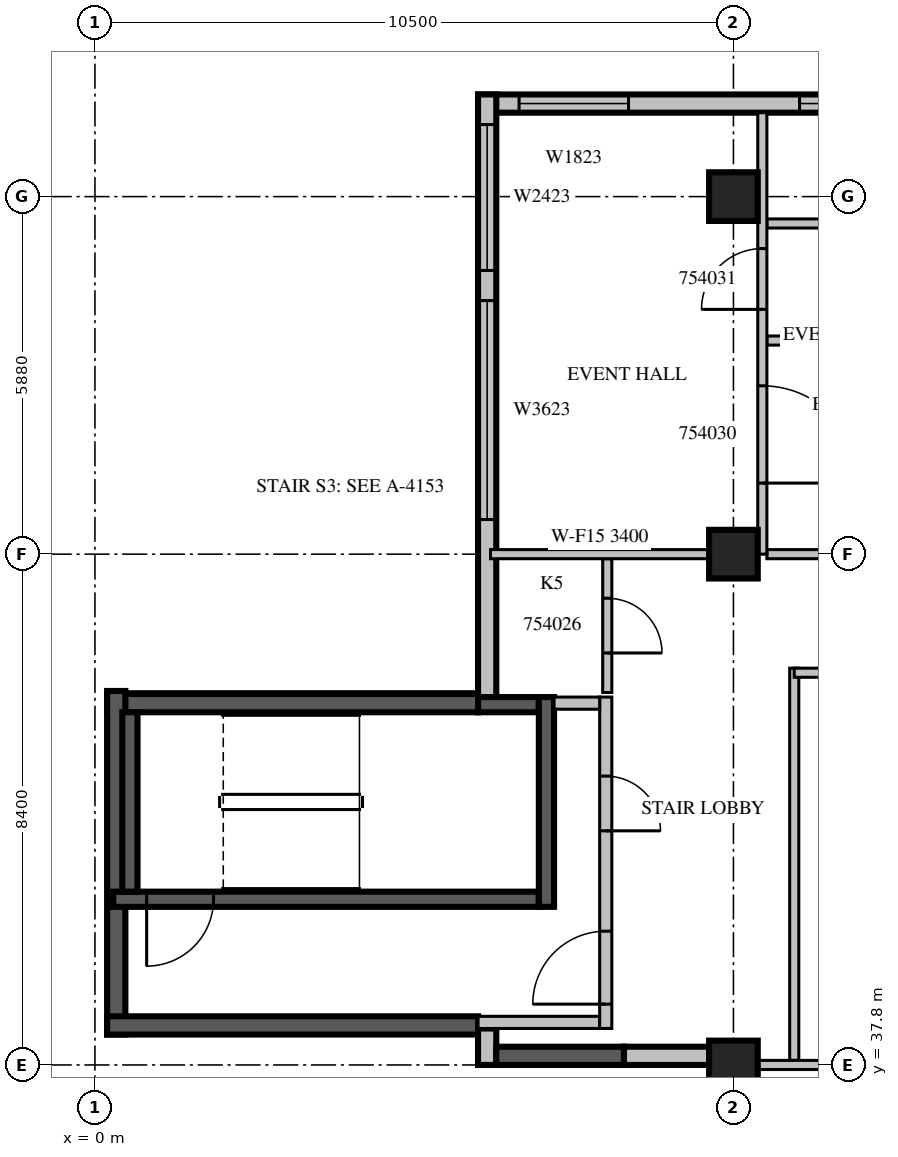
"""IFC4 building model, lengths in metres.
Left out: names, types, materials, properties, quantities, classifications, styles, units other than length and angle.
Written with IfcOpenShell. Run it as: python <this file> out.ifc"""

import sys

from ifc_helpers import new_model, si_unit, direction, frame, frame_2d, origin, origin_2d, place, context, subcontext, project, spatial, rectangle, extrude, source, transform, mapped, element, fill, save


model = new_model("IFC4")
c1 = context("Model", 3, precision=1e-05, world=origin(), true_north=direction((0.0, 1.0)))
c2 = subcontext(c1, "Body", "Model", "MODEL_VIEW")
j1 = project(units=[si_unit("LENGTHUNIT", "METRE"), si_unit("PLANEANGLEUNIT", "RADIAN")], contexts=[c1])
p1 = place(None, origin())
s1 = spatial("IfcSite", under=j1, at=p1, CompositionType="ELEMENT")
p2 = place(p1, origin())
s2 = spatial("IfcBuilding", under=s1, at=p2, CompositionType="ELEMENT")
p3 = place(p2, frame((0.0, 0.0, 238.6)))
s3 = spatial("IfcBuildingStorey", under=s2, at=p3, CompositionType="ELEMENT", Elevation=238.6)
m1 = source(origin(), c2, "Body", "SweptSolid", [
    extrude(rectangle(XDim=0.8, YDim=0.8, at=origin_2d()), origin(), (0.0, 0.0, 1.0), 3.8),
])
for number, where, z_axis, x_axis in (
    (1, (10.5, 37.8, 0.0), (0.0, 0.0, 1.0), (1.0, 0.0, 0.0)),
    (2, (10.5, 46.2, 0.0), (0.0, 0.0, 1.0), (1.0, 0.0, 0.0)),
    (3, (10.5, 52.08, 0.0), (0.0, 0.0, 1.0), (1.0, 0.0, 0.0)),
):
    element("IfcColumn", number, at=place(p3, frame(where, z_axis=z_axis, x_axis=x_axis)), inside=s3, PredefinedType="COLUMN", context=c2, shape_type="MappedRepresentation", body=[
        mapped(m1, transform((0.0, 0.0, 0.0), scale=1.0)),
    ])
m2 = source(origin(), c2, "Body", "SweptSolid", [
    extrude(rectangle(XDim=10.5, YDim=0.3, at=frame_2d((5.25, 0.0))), origin(), (0.0, 0.0, 1.0), 3.4),
])
p4 = place(p3, frame((16.8, 53.61, 0.0), z_axis=(0.0, 0.0, 1.0), x_axis=(-1.0, 0.0, 0.0)))
e4 = element("IfcWall", 4, at=p4, inside=s3, PredefinedType="STANDARD", context=c2, shape_type="MappedRepresentation", body=[
    mapped(m2, transform((0.0, 0.0, 0.0), scale=1.0)),
])
m3 = source(origin(), c2, "Body", "SweptSolid", [
    extrude(rectangle(XDim=1.8, YDim=2.3, at=frame_2d((0.9, 1.15))), frame((0.0, 0.16, 0.0), z_axis=(0.0, -1.0, 0.0), x_axis=(1.0, 0.0, 0.0)), (0.0, 0.0, 1.0), 0.32),
])
p5 = place(p4, frame((8.025, 0.0, 0.6)))
e5 = element("IfcOpeningElement", 5, at=p5, cuts=e4, PredefinedType="OPENING", context=c2, shape_type="MappedRepresentation", body=[
    mapped(m3, transform((0.0, 0.0, 0.0), scale=1.0)),
])
m4 = source(origin(), c2, "Body", "SweptSolid", [
    extrude(rectangle(XDim=2.4, YDim=2.3, at=frame_2d((1.2, 1.15))), frame((0.0, 0.16, 0.0), z_axis=(0.0, -1.0, 0.0), x_axis=(1.0, 0.0, 0.0)), (0.0, 0.0, 1.0), 0.32),
])
p6 = place(p4, frame((2.812, 0.0, 0.6)))
e6 = element("IfcOpeningElement", 6, at=p6, cuts=e4, PredefinedType="OPENING", context=c2, shape_type="MappedRepresentation", body=[
    mapped(m4, transform((0.0, 0.0, 0.0), scale=1.0)),
])
m5 = source(origin(), c2, "Body", "SweptSolid", [
    extrude(rectangle(XDim=9.91, YDim=0.3, at=frame_2d((4.955, 0.0))), origin(), (0.0, 0.0, 1.0), 3.4),
])
p7 = place(p3, frame((6.45, 53.76, 0.0), z_axis=(0.0, 0.0, 1.0), x_axis=(0.0, -1.0, 0.0)))
e7 = element("IfcWall", 7, at=p7, inside=s3, PredefinedType="STANDARD", context=c2, shape_type="MappedRepresentation", body=[
    mapped(m5, transform((0.0, 0.0, 0.0), scale=1.0)),
])
m6 = source(origin(), c2, "Body", "SweptSolid", [
    extrude(rectangle(XDim=3.6, YDim=2.3, at=frame_2d((1.8, 1.15))), frame((0.0, 0.16, 0.0), z_axis=(0.0, -1.0, 0.0), x_axis=(1.0, 0.0, 0.0)), (0.0, 0.0, 1.0), 0.32),
])
p8 = place(p7, frame((3.39, 0.0, 0.6)))
e8 = element("IfcOpeningElement", 8, at=p8, cuts=e7, PredefinedType="OPENING", context=c2, shape_type="MappedRepresentation", body=[
    mapped(m6, transform((0.0, 0.0, 0.0), scale=1.0)),
])
p9 = place(p7, frame((0.495, 0.0, 0.6)))
e9 = element("IfcOpeningElement", 9, at=p9, cuts=e7, PredefinedType="OPENING", context=c2, shape_type="MappedRepresentation", body=[
    mapped(m4, transform((0.0, 0.0, 0.0), scale=1.0)),
])
m7 = source(origin(), c2, "Body", "SweptSolid", [
    extrude(rectangle(XDim=6.1, YDim=0.3, at=frame_2d((3.05, 0.0))), origin(), (0.0, 0.0, 1.0), 3.4),
])
p10 = place(p3, frame((6.3, 43.75, 0.0), z_axis=(0.0, 0.0, 1.0), x_axis=(-1.0, 0.0, 0.0)))
e10 = element("IfcWall", 10, at=p10, inside=s3, PredefinedType="SOLIDWALL", context=c2, shape_type="MappedRepresentation", body=[
    mapped(m7, transform((0.0, 0.0, 0.0), scale=1.0)),
])
m8 = source(origin(), c2, "Body", "SweptSolid", [
    extrude(rectangle(XDim=5.65, YDim=0.3, at=frame_2d((2.825, 0.0))), origin(), (0.0, 0.0, 1.0), 3.4),
])
p11 = place(p3, frame((0.35, 43.95, 0.0), z_axis=(0.0, 0.0, 1.0), x_axis=(0.0, -1.0, 0.0)))
e11 = element("IfcWall", 11, at=p11, inside=s3, PredefinedType="SOLIDWALL", context=c2, shape_type="MappedRepresentation", body=[
    mapped(m8, transform((0.0, 0.0, 0.0), scale=1.0)),
])
p12 = place(p3, frame((0.2, 38.45, 0.0), z_axis=(0.0, 0.0, 1.0), x_axis=(1.0, 0.0, 0.0)))
e12 = element("IfcWall", 12, at=p12, inside=s3, PredefinedType="SOLIDWALL", context=c2, shape_type="MappedRepresentation", body=[
    mapped(m7, transform((0.0, 0.0, 0.0), scale=1.0)),
])
m9 = source(origin(), c2, "Body", "SweptSolid", [
    extrude(rectangle(XDim=0.6, YDim=0.3, at=frame_2d((0.3, 0.0))), origin(), (0.0, 0.0, 1.0), 3.4),
])
p13 = place(p3, frame((6.45, 38.4, 0.0), z_axis=(0.0, 0.0, 1.0), x_axis=(0.0, -1.0, 0.0)))
e13 = element("IfcWall", 13, at=p13, inside=s3, PredefinedType="STANDARD", context=c2, shape_type="MappedRepresentation", body=[
    mapped(m9, transform((0.0, 0.0, 0.0), scale=1.0)),
])
m10 = source(origin(), c2, "Body", "SweptSolid", [
    extrude(rectangle(XDim=2.1, YDim=0.3, at=frame_2d((1.05, 0.0))), origin(), (0.0, 0.0, 1.0), 3.4),
])
p14 = place(p3, frame((6.6, 37.95, 0.0), z_axis=(0.0, 0.0, 1.0), x_axis=(1.0, 0.0, 0.0)))
e14 = element("IfcWall", 14, at=p14, inside=s3, PredefinedType="SOLIDWALL", context=c2, shape_type="MappedRepresentation", body=[
    mapped(m10, transform((0.0, 0.0, 0.0), scale=1.0)),
])
m11 = source(origin(), c2, "Body", "SweptSolid", [
    extrude(rectangle(XDim=1.4, YDim=0.3, at=frame_2d((0.7, 0.0))), origin(), (0.0, 0.0, 1.0), 3.4),
])
p15 = place(p3, frame((8.7, 37.95, 0.0), z_axis=(0.0, 0.0, 1.0), x_axis=(1.0, 0.0, 0.0)))
e15 = element("IfcWall", 15, at=p15, inside=s3, PredefinedType="STANDARD", context=c2, shape_type="MappedRepresentation", body=[
    mapped(m11, transform((0.0, 0.0, 0.0), scale=1.0)),
])
m12 = source(origin(), c2, "Body", "SweptSolid", [
    extrude(rectangle(XDim=7.0, YDim=0.25, at=frame_2d((3.5, 0.0))), origin(), (0.0, 0.0, 1.0), 3.4),
])
p16 = place(p3, frame((0.3, 40.525, 0.0), z_axis=(0.0, 0.0, 1.0), x_axis=(1.0, 0.0, 0.0)))
e16 = element("IfcWall", 16, at=p16, inside=s3, PredefinedType="SOLIDWALL", context=c2, shape_type="MappedRepresentation", body=[
    mapped(m12, transform((0.0, 0.0, 0.0), scale=1.0)),
])
m13 = source(origin(), c2, "Body", "SweptSolid", [
    extrude(rectangle(XDim=1.1, YDim=2.1, at=frame_2d((0.55, 1.05))), frame((0.0, 0.135, 0.0), z_axis=(0.0, -1.0, 0.0), x_axis=(1.0, 0.0, 0.0)), (0.0, 0.0, 1.0), 0.27),
])
p17 = place(p16, frame((0.55, 0.0, 0.0)))
e17 = element("IfcOpeningElement", 17, at=p17, cuts=e16, PredefinedType="OPENING", context=c2, shape_type="MappedRepresentation", body=[
    mapped(m13, transform((0.0, 0.0, 0.0), scale=1.0)),
])
m14 = source(origin(), c2, "Body", "SweptSolid", [
    extrude(rectangle(XDim=1.0, YDim=0.25, at=frame_2d((0.5, 0.0))), origin(), (0.0, 0.0, 1.0), 3.4),
])
p18 = place(p3, frame((6.3, 43.725, 0.0), z_axis=(0.0, 0.0, 1.0), x_axis=(1.0, 0.0, 0.0)))
e18 = element("IfcWall", 18, at=p18, inside=s3, PredefinedType="SOLIDWALL", context=c2, shape_type="MappedRepresentation", body=[
    mapped(m14, transform((0.0, 0.0, 0.0), scale=1.0)),
])
m15 = source(origin(), c2, "Body", "SweptSolid", [
    extrude(rectangle(XDim=3.45, YDim=0.25, at=frame_2d((1.725, 0.0))), origin(), (0.0, 0.0, 1.0), 3.4),
])
p19 = place(p3, frame((7.425, 40.4, 0.0), z_axis=(0.0, 0.0, 1.0), x_axis=(0.0, 1.0, 0.0)))
e19 = element("IfcWall", 19, at=p19, inside=s3, PredefinedType="SOLIDWALL", context=c2, shape_type="MappedRepresentation", body=[
    mapped(m15, transform((0.0, 0.0, 0.0), scale=1.0)),
])
m16 = source(origin(), c2, "Body", "SweptSolid", [
    extrude(rectangle(XDim=2.95, YDim=0.25, at=frame_2d((1.475, 0.0))), origin(), (0.0, 0.0, 1.0), 3.4),
])
p20 = place(p3, frame((0.575, 40.65, 0.0), z_axis=(0.0, 0.0, 1.0), x_axis=(0.0, 1.0, 0.0)))
e20 = element("IfcWall", 20, at=p20, inside=s3, PredefinedType="SOLIDWALL", context=c2, shape_type="MappedRepresentation", body=[
    mapped(m16, transform((0.0, 0.0, 0.0), scale=1.0)),
])
m17 = source(origin(), c2, "Body", "SweptSolid", [
    extrude(rectangle(XDim=2.0, YDim=0.2, at=frame_2d((1.0, 0.0))), origin(), (0.0, 0.0, 1.0), 3.4),
])
p21 = place(p3, frame((6.3, 38.5, 0.0), z_axis=(0.0, 0.0, 1.0), x_axis=(1.0, 0.0, 0.0)))
e21 = element("IfcWall", 21, at=p21, inside=s3, PredefinedType="PARTITIONING", context=c2, shape_type="MappedRepresentation", body=[
    mapped(m17, transform((0.0, 0.0, 0.0), scale=1.0)),
])
m18 = source(origin(), c2, "Body", "SweptSolid", [
    extrude(rectangle(XDim=5.45, YDim=0.2, at=frame_2d((2.725, 0.0))), origin(), (0.0, 0.0, 1.0), 3.4),
])
p22 = place(p3, frame((8.4, 38.4, 0.0), z_axis=(0.0, 0.0, 1.0), x_axis=(0.0, 1.0, 0.0)))
e22 = element("IfcWall", 22, at=p22, inside=s3, PredefinedType="PARTITIONING", context=c2, shape_type="MappedRepresentation", body=[
    mapped(m18, transform((0.0, 0.0, 0.0), scale=1.0)),
])
m19 = source(origin(), c2, "Body", "SweptSolid", [
    extrude(rectangle(XDim=1.2, YDim=2.1, at=frame_2d((0.6, 1.05))), frame((0.0, 0.11, 0.0), z_axis=(0.0, -1.0, 0.0), x_axis=(1.0, 0.0, 0.0)), (0.0, 0.0, 1.0), 0.22),
])
p23 = place(p22, frame((0.4, 0.0, 0.0)))
e23 = element("IfcOpeningElement", 23, at=p23, cuts=e22, PredefinedType="OPENING", context=c2, shape_type="MappedRepresentation", body=[
    mapped(m19, transform((0.0, 0.0, 0.0), scale=1.0)),
])
m20 = source(origin(), c2, "Body", "SweptSolid", [
    extrude(rectangle(XDim=0.9, YDim=2.1, at=frame_2d((0.45, 1.05))), frame((0.0, 0.11, 0.0), z_axis=(0.0, -1.0, 0.0), x_axis=(1.0, 0.0, 0.0)), (0.0, 0.0, 1.0), 0.22),
])
p24 = place(p22, frame((3.25, 0.0, 0.0)))
e24 = element("IfcOpeningElement", 24, at=p24, cuts=e22, PredefinedType="OPENING", context=c2, shape_type="MappedRepresentation", body=[
    mapped(m20, transform((0.0, 0.0, 0.0), scale=1.0)),
])
m21 = source(origin(), c2, "Body", "SweptSolid", [
    extrude(rectangle(XDim=0.75, YDim=0.2, at=frame_2d((0.375, 0.0))), origin(), (0.0, 0.0, 1.0), 3.4),
])
p25 = place(p3, frame((7.55, 43.75, 0.0), z_axis=(0.0, 0.0, 1.0), x_axis=(1.0, 0.0, 0.0)))
e25 = element("IfcWall", 25, at=p25, inside=s3, PredefinedType="PARTITIONING", context=c2, shape_type="MappedRepresentation", body=[
    mapped(m21, transform((0.0, 0.0, 0.0), scale=1.0)),
])
m22 = source(origin(), c2, "Body", "SweptSolid", [
    extrude(rectangle(XDim=6.45, YDim=0.15, at=frame_2d((3.225, 0.0))), origin(), (0.0, 0.0, 1.0), 3.4),
])
p26 = place(p3, frame((11.5, 44.325, 0.0), z_axis=(0.0, 0.0, 1.0), x_axis=(0.0, -1.0, 0.0)))
e26 = element("IfcWall", 26, at=p26, inside=s3, PredefinedType="PARTITIONING", context=c2, shape_type="MappedRepresentation", body=[
    mapped(m22, transform((0.0, 0.0, 0.0), scale=1.0)),
])
m23 = source(origin(), c2, "Body", "SweptSolid", [
    extrude(rectangle(XDim=3.275, YDim=0.15, at=frame_2d((1.637, 0.0))), origin(), (0.0, 0.0, 1.0), 3.4),
])
p27 = place(p3, frame((14.775, 44.25, 0.0), z_axis=(0.0, 0.0, 1.0), x_axis=(-1.0, 0.0, 0.0)))
e27 = element("IfcWall", 27, at=p27, inside=s3, PredefinedType="PARTITIONING", context=c2, shape_type="MappedRepresentation", body=[
    mapped(m23, transform((0.0, 0.0, 0.0), scale=1.0)),
])
m24 = source(origin(), c2, "Body", "SweptSolid", [
    extrude(rectangle(XDim=2.2, YDim=0.15, at=frame_2d((1.1, 0.0))), origin(), (0.0, 0.0, 1.0), 3.4),
])
p28 = place(p3, frame((8.425, 43.925, 0.0), z_axis=(0.0, 0.0, 1.0), x_axis=(0.0, 1.0, 0.0)))
e28 = element("IfcWall", 28, at=p28, inside=s3, PredefinedType="PARTITIONING", context=c2, shape_type="MappedRepresentation", body=[
    mapped(m24, transform((0.0, 0.0, 0.0), scale=1.0)),
])
m25 = source(origin(), c2, "Body", "SweptSolid", [
    extrude(rectangle(XDim=0.9, YDim=2.1, at=frame_2d((0.45, 1.05))), frame((0.0, 0.085, 0.0), z_axis=(0.0, -1.0, 0.0), x_axis=(1.0, 0.0, 0.0)), (0.0, 0.0, 1.0), 0.17),
])
p29 = place(p28, frame((0.65, 0.0, 0.0)))
e29 = element("IfcOpeningElement", 29, at=p29, cuts=e28, PredefinedType="OPENING", context=c2, shape_type="MappedRepresentation", body=[
    mapped(m25, transform((0.0, 0.0, 0.0), scale=1.0)),
])
m26 = source(origin(), c2, "Body", "SweptSolid", [
    extrude(rectangle(XDim=3.801, YDim=0.15, at=frame_2d((1.901, 0.0))), origin(), (0.0, 0.0, 1.0), 3.4),
])
p30 = place(p3, frame((14.7, 37.8, 0.0), z_axis=(0.0, 0.0, 1.0), x_axis=(-1.0, 0.0, 0.0)))
e30 = element("IfcWall", 30, at=p30, inside=s3, PredefinedType="PARTITIONING", context=c2, shape_type="MappedRepresentation", body=[
    mapped(m26, transform((0.0, 0.0, 0.0), scale=1.0)),
])
m27 = source(origin(), c2, "Body", "SweptSolid", [
    extrude(rectangle(XDim=3.65, YDim=0.15, at=frame_2d((1.825, 0.0))), origin(), (0.0, 0.0, 1.0), 3.4),
])
p31 = place(p3, frame((14.7, 49.713, 0.0), z_axis=(0.0, 0.0, 1.0), x_axis=(-1.0, 0.0, 0.0)))
e31 = element("IfcWall", 31, at=p31, inside=s3, PredefinedType="PARTITIONING", context=c2, shape_type="MappedRepresentation", body=[
    mapped(m27, transform((0.0, 0.0, 0.0), scale=1.0)),
])
p32 = place(p3, frame((14.7, 51.638, 0.0), z_axis=(0.0, 0.0, 1.0), x_axis=(-1.0, 0.0, 0.0)))
e32 = element("IfcWall", 32, at=p32, inside=s3, PredefinedType="PARTITIONING", context=c2, shape_type="MappedRepresentation", body=[
    mapped(m27, transform((0.0, 0.0, 0.0), scale=1.0)),
])
p33 = place(p32, frame((1.375, 0.0, 0.0)))
e33 = element("IfcOpeningElement", 33, at=p33, cuts=e32, PredefinedType="OPENING", context=c2, shape_type="MappedRepresentation", body=[
    mapped(m25, transform((0.0, 0.0, 0.0), scale=1.0)),
])
m28 = source(origin(), c2, "Body", "SweptSolid", [
    extrude(rectangle(XDim=3.596, YDim=0.15, at=frame_2d((1.798, 0.0))), origin(), (0.0, 0.0, 1.0), 3.4),
])
p34 = place(p3, frame((10.101, 46.2, 0.0), z_axis=(0.0, 0.0, 1.0), x_axis=(-1.0, 0.0, 0.0)))
e34 = element("IfcWall", 34, at=p34, inside=s3, PredefinedType="PARTITIONING", context=c2, shape_type="MappedRepresentation", body=[
    mapped(m28, transform((0.0, 0.0, 0.0), scale=1.0)),
])
p35 = place(p3, frame((14.7, 46.2, 0.0), z_axis=(0.0, 0.0, 1.0), x_axis=(-1.0, 0.0, 0.0)))
e35 = element("IfcWall", 35, at=p35, inside=s3, PredefinedType="PARTITIONING", context=c2, shape_type="MappedRepresentation", body=[
    mapped(m27, transform((0.0, 0.0, 0.0), scale=1.0)),
])
m29 = source(origin(), c2, "Body", "SweptSolid", [
    extrude(rectangle(XDim=7.26, YDim=0.15, at=frame_2d((3.63, 0.0))), origin(), (0.0, 0.0, 1.0), 3.4),
])
p36 = place(p3, frame((10.975, 46.2, 0.0), z_axis=(0.0, 0.0, 1.0), x_axis=(0.0, 1.0, 0.0)))
e36 = element("IfcWall", 36, at=p36, inside=s3, PredefinedType="PARTITIONING", context=c2, shape_type="MappedRepresentation", body=[
    mapped(m29, transform((0.0, 0.0, 0.0), scale=1.0)),
])
m30 = source(origin(), c2, "Body", "SweptSolid", [
    extrude(rectangle(XDim=1.6, YDim=2.1, at=frame_2d((0.8, 1.05))), frame((0.0, 0.085, 0.0), z_axis=(0.0, -1.0, 0.0), x_axis=(1.0, 0.0, 0.0)), (0.0, 0.0, 1.0), 0.17),
])
p37 = place(p36, frame((1.169, 0.0, 0.0)))
e37 = element("IfcOpeningElement", 37, at=p37, cuts=e36, PredefinedType="OPENING", context=c2, shape_type="MappedRepresentation", body=[
    mapped(m30, transform((0.0, 0.0, 0.0), scale=1.0)),
])
m31 = source(origin(), c2, "Body", "SweptSolid", [
    extrude(rectangle(XDim=1.0, YDim=2.1, at=frame_2d((0.5, 1.05))), frame((0.0, 0.085, 0.0), z_axis=(0.0, -1.0, 0.0), x_axis=(1.0, 0.0, 0.0)), (0.0, 0.0, 1.0), 0.17),
])
p38 = place(p36, frame((4.025, 0.0, 0.0)))
e38 = element("IfcOpeningElement", 38, at=p38, cuts=e36, PredefinedType="OPENING", context=c2, shape_type="MappedRepresentation", body=[
    mapped(m31, transform((0.0, 0.0, 0.0), scale=1.0)),
])
m32 = source(origin(), c2, "Body", "SweptSolid", [
    extrude(rectangle(XDim=1.8, YDim=2.3, at=frame_2d((0.9, 1.15))), frame((0.0, 0.03, 0.0), z_axis=(0.0, -1.0, 0.0), x_axis=(1.0, 0.0, 0.0)), (0.0, 0.0, 1.0), 0.06),
])
p39 = place(p5, origin())
e39 = element("IfcWindow", 39, at=p39, inside=s3, PartitioningType="SINGLE_PANEL", PredefinedType="WINDOW", context=c2, shape_type="MappedRepresentation", body=[
    mapped(m32, transform((0.0, 0.0, 0.0), scale=1.0)),
])
fill(e5, e39)
m33 = source(origin(), c2, "Body", "SweptSolid", [
    extrude(rectangle(XDim=2.4, YDim=2.3, at=frame_2d((1.2, 1.15))), frame((0.0, 0.03, 0.0), z_axis=(0.0, -1.0, 0.0), x_axis=(1.0, 0.0, 0.0)), (0.0, 0.0, 1.0), 0.06),
])
p40 = place(p6, origin())
e40 = element("IfcWindow", 40, at=p40, inside=s3, PartitioningType="SINGLE_PANEL", PredefinedType="WINDOW", context=c2, shape_type="MappedRepresentation", body=[
    mapped(m33, transform((0.0, 0.0, 0.0), scale=1.0)),
])
fill(e6, e40)
m34 = source(origin(), c2, "Body", "SweptSolid", [
    extrude(rectangle(XDim=3.6, YDim=2.3, at=frame_2d((1.8, 1.15))), frame((0.0, 0.03, 0.0), z_axis=(0.0, -1.0, 0.0), x_axis=(1.0, 0.0, 0.0)), (0.0, 0.0, 1.0), 0.06),
])
p41 = place(p8, origin())
e41 = element("IfcWindow", 41, at=p41, inside=s3, PartitioningType="SINGLE_PANEL", PredefinedType="WINDOW", context=c2, shape_type="MappedRepresentation", body=[
    mapped(m34, transform((0.0, 0.0, 0.0), scale=1.0)),
])
fill(e8, e41)
p42 = place(p9, origin())
e42 = element("IfcWindow", 42, at=p42, inside=s3, PartitioningType="SINGLE_PANEL", PredefinedType="WINDOW", context=c2, shape_type="MappedRepresentation", body=[
    mapped(m33, transform((0.0, 0.0, 0.0), scale=1.0)),
])
fill(e9, e42)
m35 = source(origin(), c2, "Body", "SweptSolid", [
    extrude(rectangle(XDim=1.1, YDim=2.1, at=frame_2d((0.55, 1.05))), frame((0.0, 0.025, 0.0), z_axis=(0.0, -1.0, 0.0), x_axis=(1.0, 0.0, 0.0)), (0.0, 0.0, 1.0), 0.05),
])
p43 = place(p17, origin())
e43 = element("IfcDoor", 43, at=p43, inside=s3, OperationType="SINGLE_SWING_RIGHT", PredefinedType="DOOR", context=c2, shape_type="MappedRepresentation", body=[
    mapped(m35, transform((0.0, 0.0, 0.0), scale=1.0)),
])
fill(e17, e43)
m36 = source(origin(), c2, "Body", "SweptSolid", [
    extrude(rectangle(XDim=1.2, YDim=2.1, at=frame_2d((0.6, 1.05))), frame((0.0, 0.025, 0.0), z_axis=(0.0, -1.0, 0.0), x_axis=(1.0, 0.0, 0.0)), (0.0, 0.0, 1.0), 0.05),
])
p44 = place(p23, origin())
e44 = element("IfcDoor", 44, at=p44, inside=s3, OperationType="SINGLE_SWING_LEFT", PredefinedType="DOOR", context=c2, shape_type="MappedRepresentation", body=[
    mapped(m36, transform((0.0, 0.0, 0.0), scale=1.0)),
])
fill(e23, e44)
m37 = source(origin(), c2, "Body", "SweptSolid", [
    extrude(rectangle(XDim=0.9, YDim=2.1, at=frame_2d((0.45, 1.05))), frame((0.0, 0.025, 0.0), z_axis=(0.0, -1.0, 0.0), x_axis=(1.0, 0.0, 0.0)), (0.0, 0.0, 1.0), 0.05),
])
p45 = place(p24, origin())
e45 = element("IfcDoor", 45, at=p45, inside=s3, OperationType="SINGLE_SWING_RIGHT", PredefinedType="DOOR", context=c2, shape_type="MappedRepresentation", body=[
    mapped(m37, transform((0.0, 0.0, 0.0), scale=1.0)),
])
fill(e24, e45)
p46 = place(p29, origin())
e46 = element("IfcDoor", 46, at=p46, inside=s3, OperationType="SINGLE_SWING_RIGHT", PredefinedType="DOOR", context=c2, shape_type="MappedRepresentation", body=[
    mapped(m37, transform((0.0, 0.0, 0.0), scale=1.0)),
])
fill(e29, e46)
m38 = source(origin(), c2, "Body", "SweptSolid", [
    extrude(rectangle(XDim=1.6, YDim=2.1, at=frame_2d((0.8, 1.05))), frame((0.0, 0.025, 0.0), z_axis=(0.0, -1.0, 0.0), x_axis=(1.0, 0.0, 0.0)), (0.0, 0.0, 1.0), 0.05),
])
p47 = place(p37, origin())
e47 = element("IfcDoor", 47, at=p47, inside=s3, OperationType="SINGLE_SWING_RIGHT", PredefinedType="DOOR", context=c2, shape_type="MappedRepresentation", body=[
    mapped(m38, transform((0.0, 0.0, 0.0), scale=1.0)),
])
fill(e37, e47)
m39 = source(origin(), c2, "Body", "SweptSolid", [
    extrude(rectangle(XDim=1.0, YDim=2.1, at=frame_2d((0.5, 1.05))), frame((0.0, 0.025, 0.0), z_axis=(0.0, -1.0, 0.0), x_axis=(1.0, 0.0, 0.0)), (0.0, 0.0, 1.0), 0.05),
])
p48 = place(p38, origin())
e48 = element("IfcDoor", 48, at=p48, inside=s3, OperationType="SINGLE_SWING_LEFT", PredefinedType="DOOR", context=c2, shape_type="MappedRepresentation", body=[
    mapped(m39, transform((0.0, 0.0, 0.0), scale=1.0)),
])
fill(e38, e48)
save(model, sys.argv[1])
